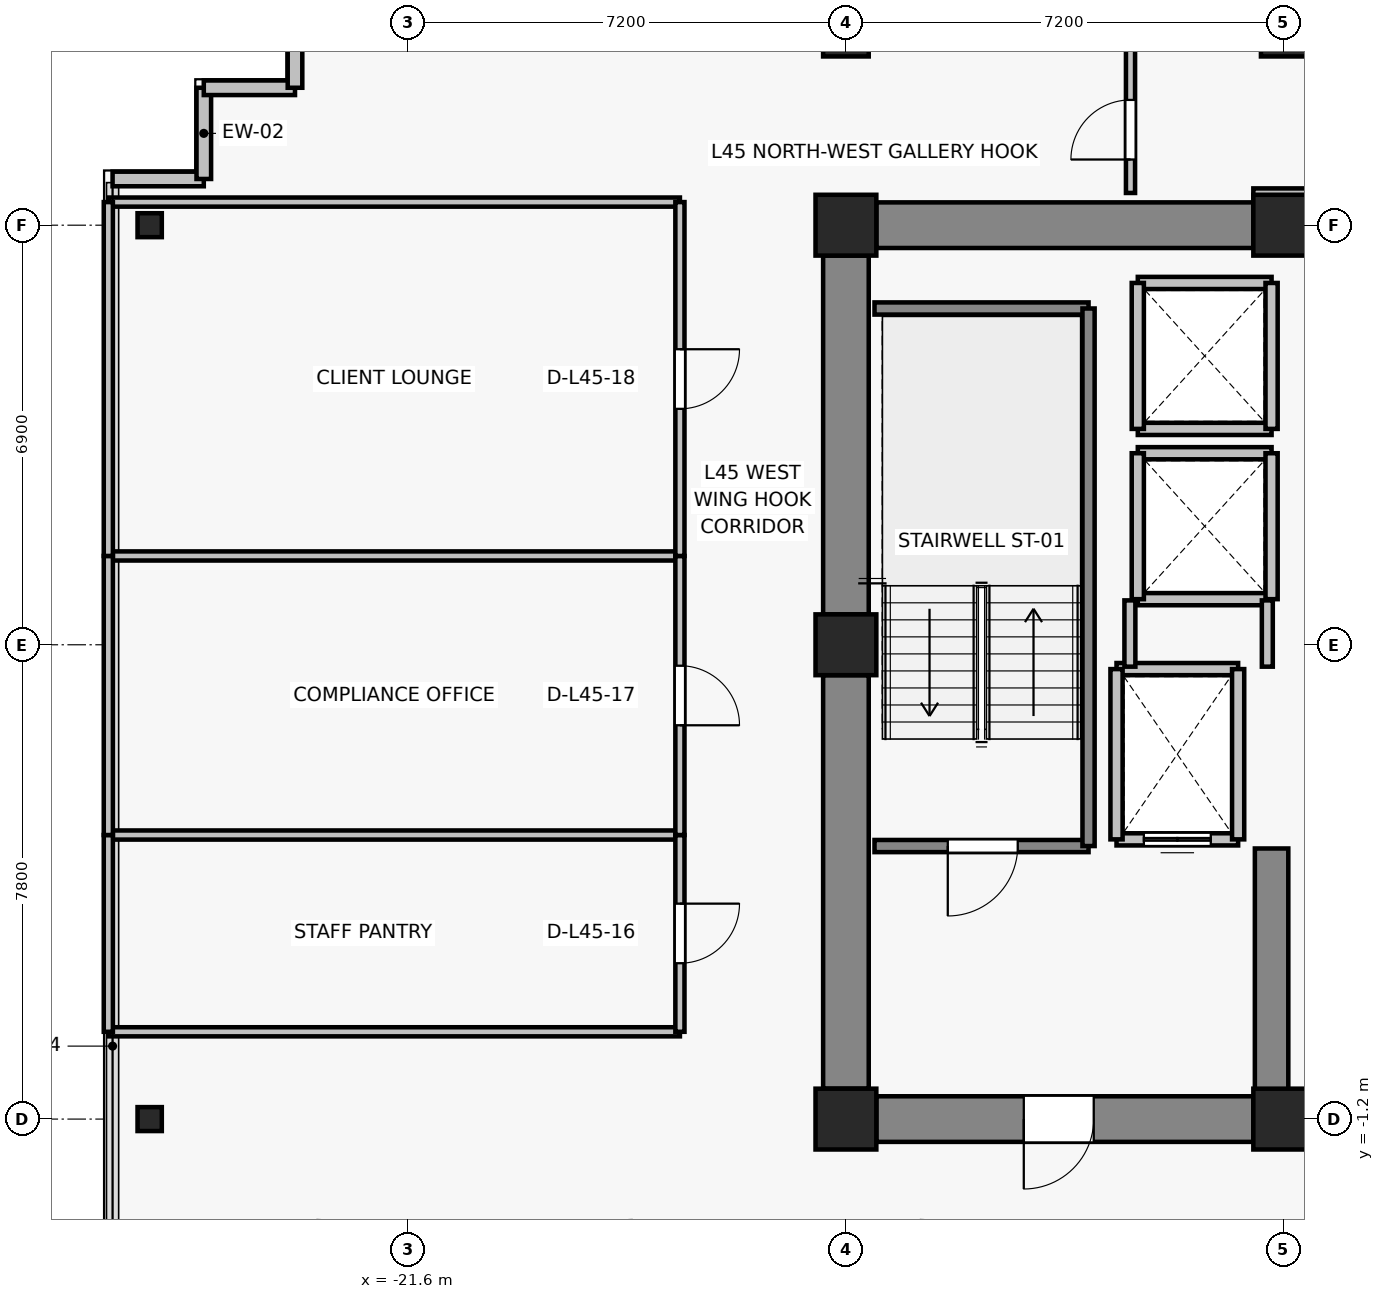
"""IFC4 building model, lengths in metres.
Left out: names, types, materials, properties, quantities, classifications, styles, units other than length and angle.
Written with IfcOpenShell. Run it as: python <this file> out.ifc"""

import sys

from ifc_helpers import new_model, si_unit, direction, frame, frame_2d, origin, origin_2d, place, context, subcontext, project, spatial, rectangle, i_section, extrude, source, transform, mapped, element, fill, save


model = new_model("IFC4")
c1 = context("Model", 3, precision=1e-05, world=origin(), true_north=direction((0.0, 1.0)))
c2 = subcontext(c1, "Body", "Model", "MODEL_VIEW")
j1 = project(units=[si_unit("LENGTHUNIT", "METRE"), si_unit("PLANEANGLEUNIT", "RADIAN")], contexts=[c1])
p1 = place(None, origin())
s1 = spatial("IfcSite", under=j1, at=p1, CompositionType="ELEMENT")
p2 = place(p1, origin())
s2 = spatial("IfcBuilding", under=s1, at=p2, CompositionType="ELEMENT")
p3 = place(p2, frame((0.0, 0.0, 162.7)))
s3 = spatial("IfcBuildingStorey", under=s2, at=p3, CompositionType="ELEMENT", Elevation=162.7)
for number, where, z_axis, x_axis in (
    (1, (-14.4, -1.2, 0.0), (0.0, 0.0, 1.0), (1.0, 0.0, 0.0)),
    (2, (-7.2, -1.2, 0.0), (0.0, 0.0, 1.0), (1.0, 0.0, 0.0)),
    (3, (-14.4, 6.6, 0.0), (0.0, 0.0, 1.0), (1.0, 0.0, 0.0)),
    (4, (-14.4, 13.5, 0.0), (0.0, 0.0, 1.0), (1.0, 0.0, 0.0)),
    (5, (-7.2, 13.5, 0.0), (0.0, 0.0, 1.0), (1.0, 0.0, 0.0)),
):
    element("IfcColumn", number, at=place(p3, frame(where, z_axis=z_axis, x_axis=x_axis)), inside=s3, PredefinedType="COLUMN", context=c2, shape_type="SweptSolid", body=[
        extrude(rectangle(XDim=1.0, YDim=1.0, at=origin_2d()), origin(), (0.0, 0.0, 1.0), 3.3),
    ])
for number, where, z_axis, x_axis in (
    (6, (-14.4, 16.65, 0.0), (0.0, 0.0, 1.0), (1.0, 0.0, 0.0)),
    (7, (-7.2, 16.65, 0.0), (0.0, 0.0, 1.0), (1.0, 0.0, 0.0)),
):
    element("IfcColumn", number, at=place(p3, frame(where, z_axis=z_axis, x_axis=x_axis)), inside=s3, PredefinedType="COLUMN", context=c2, shape_type="SweptSolid", body=[
        extrude(rectangle(XDim=0.75, YDim=0.75, at=origin_2d()), origin(), (0.0, 0.0, 1.0), 3.3),
    ])
for number, where, z_axis, x_axis in (
    (8, (-25.85, -1.2, 0.0), (0.0, 0.0, 1.0), (1.0, 0.0, 0.0)),
    (9, (-25.85, 13.5, 0.0), (0.0, 0.0, 1.0), (1.0, 0.0, 0.0)),
):
    element("IfcColumn", number, at=place(p3, frame(where, z_axis=z_axis, x_axis=x_axis)), inside=s3, PredefinedType="COLUMN", context=c2, shape_type="SweptSolid", body=[
        extrude(i_section(OverallWidth=0.399, OverallDepth=0.394, WebThickness=0.023, FlangeThickness=0.037, FilletRadius=0.015, at=origin_2d()), origin(), (0.0, 0.0, 1.0), 3.3),
    ])
p4 = place(p3, frame((-13.9, 13.5, 0.0), z_axis=(0.0, 0.0, 1.0), x_axis=(1.0, 0.0, 0.0)))
e10 = element("IfcWall", 10, at=p4, inside=s3, PredefinedType="SHEAR", context=c2, shape_type="SweptSolid", body=[
    extrude(rectangle(XDim=6.2, YDim=0.75, at=frame_2d((3.1, 0.0))), origin(), (0.0, 0.0, 1.0), 3.075),
])
p5 = place(p3, frame((-14.4, -0.7, 0.0), z_axis=(0.0, 0.0, 1.0), x_axis=(0.0, 1.0, 0.0)))
e11 = element("IfcWall", 11, at=p5, inside=s3, PredefinedType="SHEAR", context=c2, shape_type="SweptSolid", body=[
    extrude(rectangle(XDim=6.8, YDim=0.75, at=frame_2d((3.4, 0.0))), origin(), (0.0, 0.0, 1.0), 3.075),
])
p6 = place(p3, frame((-14.4, 7.1, 0.0), z_axis=(0.0, 0.0, 1.0), x_axis=(0.0, 1.0, 0.0)))
e12 = element("IfcWall", 12, at=p6, inside=s3, PredefinedType="SHEAR", context=c2, shape_type="SweptSolid", body=[
    extrude(rectangle(XDim=5.9, YDim=0.75, at=frame_2d((2.95, 0.0))), origin(), (0.0, 0.0, 1.0), 3.075),
])
p7 = place(p3, frame((-7.7, -1.2, 0.0), z_axis=(0.0, 0.0, 1.0), x_axis=(-1.0, 0.0, 0.0)))
e13 = element("IfcWall", 13, at=p7, inside=s3, PredefinedType="SHEAR", context=c2, shape_type="SweptSolid", body=[
    extrude(rectangle(XDim=6.2, YDim=0.75, at=frame_2d((3.1, 0.0))), origin(), (0.0, 0.0, 1.0), 3.075),
])
p8 = place(p7, frame((2.625, 0.0, 0.0)))
e14 = element("IfcOpeningElement", 14, at=p8, cuts=e13, PredefinedType="OPENING", context=c2, shape_type="SweptSolid", body=[
    extrude(rectangle(XDim=1.15, YDim=2.15, at=frame_2d((0.575, 1.075))), frame((0.0, 0.385, 0.0), z_axis=(0.0, -1.0, 0.0), x_axis=(1.0, 0.0, 0.0)), (0.0, 0.0, 1.0), 0.77),
])
p9 = place(p3, frame((-7.4, -0.825, 0.0), z_axis=(0.0, 0.0, 1.0), x_axis=(0.0, 1.0, 0.0)))
e15 = element("IfcWall", 15, at=p9, inside=s3, PredefinedType="SHEAR", context=c2, shape_type="SweptSolid", body=[
    extrude(rectangle(XDim=4.075, YDim=0.55, at=frame_2d((2.038, 0.0))), origin(), (0.0, 0.0, 1.0), 3.075),
])
for number, where, z_axis, x_axis in (
    (16, (-24.96, 14.26, 0.0), (0.0, 0.0, 1.0), (-1.0, 0.0, 0.0)),
    (17, (-24.96, 15.76, 0.0), (0.0, 0.0, 1.0), (0.0, -1.0, 0.0)),
    (18, (-23.46, 15.76, 0.0), (0.0, 0.0, 1.0), (-1.0, 0.0, 0.0)),
    (19, (-23.46, 17.26, 0.0), (0.0, 0.0, 1.0), (0.0, -1.0, 0.0)),
):
    element("IfcWall", number, at=place(p3, frame(where, z_axis=z_axis, x_axis=x_axis)), inside=s3, PredefinedType="SOLIDWALL", context=c2, shape_type="SweptSolid", body=[
        extrude(rectangle(XDim=1.5, YDim=0.24, at=frame_2d((0.75, 0.0))), origin(), (0.0, 0.0, 1.0), 3.075),
    ])
p10 = place(p3, frame((-7.95, 3.4, 0.0), z_axis=(0.0, 0.0, 1.0), x_axis=(-1.0, 0.0, 0.0)))
e20 = element("IfcWall", 20, at=p10, inside=s3, PredefinedType="SOLIDWALL", context=c2, shape_type="SweptSolid", body=[
    extrude(rectangle(XDim=2.0, YDim=0.2, at=frame_2d((1.0, 0.0))), origin(), (0.0, 0.0, 1.0), 3.075),
])
p11 = place(p10, frame((0.45, 0.0, 0.0)))
e21 = element("IfcOpeningElement", 21, at=p11, cuts=e20, PredefinedType="OPENING", context=c2, shape_type="SweptSolid", body=[
    extrude(rectangle(XDim=1.1, YDim=2.2, at=frame_2d((0.55, 1.1))), frame((0.0, 0.11, 0.0), z_axis=(0.0, -1.0, 0.0), x_axis=(1.0, 0.0, 0.0)), (0.0, 0.0, 1.0), 0.22),
])
p12 = place(p3, frame((-9.95, 6.2, 0.0), z_axis=(0.0, 0.0, 1.0), x_axis=(1.0, 0.0, 0.0)))
e22 = element("IfcWall", 22, at=p12, inside=s3, PredefinedType="SOLIDWALL", context=c2, shape_type="SweptSolid", body=[
    extrude(rectangle(XDim=2.0, YDim=0.2, at=frame_2d((1.0, 0.0))), origin(), (0.0, 0.0, 1.0), 3.075),
])
for number, where, z_axis, x_axis in (
    (23, (-9.95, 3.4, 0.0), (0.0, 0.0, 1.0), (0.0, 1.0, 0.0)),
    (24, (-7.95, 6.2, 0.0), (0.0, 0.0, 1.0), (0.0, -1.0, 0.0)),
):
    element("IfcWall", number, at=place(p3, frame(where, z_axis=z_axis, x_axis=x_axis)), inside=s3, PredefinedType="SOLIDWALL", context=c2, shape_type="SweptSolid", body=[
        extrude(rectangle(XDim=2.8, YDim=0.2, at=frame_2d((1.4, 0.0))), origin(), (0.0, 0.0, 1.0), 3.075),
    ])
for number, where, z_axis, x_axis in (
    (25, (-7.4, 7.35, 0.0), (0.0, 0.0, 1.0), (-1.0, 0.0, 0.0)),
    (26, (-9.6, 9.75, 0.0), (0.0, 0.0, 1.0), (1.0, 0.0, 0.0)),
):
    element("IfcWall", number, at=place(p3, frame(where, z_axis=z_axis, x_axis=x_axis)), inside=s3, PredefinedType="SOLIDWALL", context=c2, shape_type="SweptSolid", body=[
        extrude(rectangle(XDim=2.2, YDim=0.2, at=frame_2d((1.1, 0.0))), origin(), (0.0, 0.0, 1.0), 2.565),
    ])
p13 = place(p3, frame((-9.6, 7.35, 0.0), z_axis=(0.0, 0.0, 1.0), x_axis=(0.0, 1.0, 0.0)))
e27 = element("IfcWall", 27, at=p13, inside=s3, PredefinedType="SOLIDWALL", context=c2, shape_type="SweptSolid", body=[
    extrude(rectangle(XDim=2.4, YDim=0.2, at=frame_2d((1.2, 0.0))), origin(), (0.0, 0.0, 1.0), 3.075),
])
p14 = place(p3, frame((-7.4, 9.75, 0.0), z_axis=(0.0, 0.0, 1.0), x_axis=(0.0, -1.0, 0.0)))
e28 = element("IfcWall", 28, at=p14, inside=s3, PredefinedType="SOLIDWALL", context=c2, shape_type="SweptSolid", body=[
    extrude(rectangle(XDim=2.4, YDim=0.2, at=frame_2d((1.2, 0.0))), origin(), (0.0, 0.0, 1.0), 2.565),
])
for number, where, z_axis, x_axis in (
    (29, (-7.4, 10.15, 0.0), (0.0, 0.0, 1.0), (-1.0, 0.0, 0.0)),
    (30, (-9.6, 12.55, 0.0), (0.0, 0.0, 1.0), (1.0, 0.0, 0.0)),
):
    element("IfcWall", number, at=place(p3, frame(where, z_axis=z_axis, x_axis=x_axis)), inside=s3, PredefinedType="SOLIDWALL", context=c2, shape_type="SweptSolid", body=[
        extrude(rectangle(XDim=2.2, YDim=0.2, at=frame_2d((1.1, 0.0))), origin(), (0.0, 0.0, 1.0), 2.565),
    ])
p15 = place(p3, frame((-9.6, 10.15, 0.0), z_axis=(0.0, 0.0, 1.0), x_axis=(0.0, 1.0, 0.0)))
e31 = element("IfcWall", 31, at=p15, inside=s3, PredefinedType="SOLIDWALL", context=c2, shape_type="SweptSolid", body=[
    extrude(rectangle(XDim=2.4, YDim=0.2, at=frame_2d((1.2, 0.0))), origin(), (0.0, 0.0, 1.0), 3.075),
])
p16 = place(p3, frame((-7.4, 12.55, 0.0), z_axis=(0.0, 0.0, 1.0), x_axis=(0.0, -1.0, 0.0)))
e32 = element("IfcWall", 32, at=p16, inside=s3, PredefinedType="SOLIDWALL", context=c2, shape_type="SweptSolid", body=[
    extrude(rectangle(XDim=2.4, YDim=0.2, at=frame_2d((1.2, 0.0))), origin(), (0.0, 0.0, 1.0), 2.565),
])
p17 = place(p3, frame((-10.41, 3.29, 0.0), z_axis=(0.0, 0.0, 1.0), x_axis=(-1.0, 0.0, 0.0)))
e33 = element("IfcWall", 33, at=p17, inside=s3, PredefinedType="SOLIDWALL", context=c2, shape_type="SweptSolid", body=[
    extrude(rectangle(XDim=3.52, YDim=0.2, at=frame_2d((1.76, 0.0))), origin(), (0.0, 0.0, 1.0), 3.075),
])
p18 = place(p17, frame((1.165, 0.0, 0.0)))
e34 = element("IfcOpeningElement", 34, at=p18, cuts=e33, PredefinedType="OPENING", context=c2, shape_type="SweptSolid", body=[
    extrude(rectangle(XDim=1.15, YDim=2.15, at=frame_2d((0.575, 1.075))), frame((0.0, 0.11, 0.0), z_axis=(0.0, -1.0, 0.0), x_axis=(1.0, 0.0, 0.0)), (0.0, 0.0, 1.0), 0.22),
])
p19 = place(p3, frame((-13.93, 12.13, 0.0), z_axis=(0.0, 0.0, 1.0), x_axis=(1.0, 0.0, 0.0)))
e35 = element("IfcWall", 35, at=p19, inside=s3, PredefinedType="SOLIDWALL", context=c2, shape_type="SweptSolid", body=[
    extrude(rectangle(XDim=3.52, YDim=0.2, at=frame_2d((1.76, 0.0))), origin(), (0.0, 0.0, 1.0), 3.075),
])
p20 = place(p3, frame((-10.41, 12.13, 0.0), z_axis=(0.0, 0.0, 1.0), x_axis=(0.0, -1.0, 0.0)))
e36 = element("IfcWall", 36, at=p20, inside=s3, PredefinedType="SOLIDWALL", context=c2, shape_type="SweptSolid", body=[
    extrude(rectangle(XDim=8.84, YDim=0.2, at=frame_2d((4.42, 0.0))), origin(), (0.0, 0.0, 1.0), 3.075),
])
p21 = place(p3, frame((-9.73, 6.24, 0.0), z_axis=(0.0, 0.0, 1.0), x_axis=(0.0, 1.0, 0.0)))
e37 = element("IfcWall", 37, at=p21, inside=s3, PredefinedType="PARTITIONING", context=c2, shape_type="SweptSolid", body=[
    extrude(rectangle(XDim=1.09, YDim=0.18, at=frame_2d((0.545, 0.0))), origin(), (0.0, 0.0, 1.0), 3.075),
])
p22 = place(p3, frame((-7.47, 7.33, 0.0), z_axis=(0.0, 0.0, 1.0), x_axis=(0.0, -1.0, 0.0)))
e38 = element("IfcWall", 38, at=p22, inside=s3, PredefinedType="PARTITIONING", context=c2, shape_type="SweptSolid", body=[
    extrude(rectangle(XDim=1.09, YDim=0.18, at=frame_2d((0.545, 0.0))), origin(), (0.0, 0.0, 1.0), 2.565),
])
for number, where, z_axis, x_axis in (
    (39, (-17.13, 0.236, 0.0), (0.0, 0.0, 1.0), (-1.0, 0.0, 0.0)),
    (40, (-26.53, 3.471, 0.0), (0.0, 0.0, 1.0), (1.0, 0.0, 0.0)),
):
    element("IfcWall", number, at=place(p3, frame(where, z_axis=z_axis, x_axis=x_axis)), inside=s3, PredefinedType="PARTITIONING", context=c2, shape_type="SweptSolid", body=[
        extrude(rectangle(XDim=9.4, YDim=0.15, at=frame_2d((4.7, 0.0))), origin(), (0.0, 0.0, 1.0), 2.565),
    ])
p23 = place(p3, frame((-26.53, 0.236, 0.0), z_axis=(0.0, 0.0, 1.0), x_axis=(0.0, 1.0, 0.0)))
e41 = element("IfcWall", 41, at=p23, inside=s3, PredefinedType="PARTITIONING", context=c2, shape_type="SweptSolid", body=[
    extrude(rectangle(XDim=3.236, YDim=0.15, at=frame_2d((1.618, 0.0))), origin(), (0.0, 0.0, 1.0), 3.075),
])
p24 = place(p3, frame((-17.13, 3.471, 0.0), z_axis=(0.0, 0.0, 1.0), x_axis=(0.0, -1.0, 0.0)))
e42 = element("IfcWall", 42, at=p24, inside=s3, PredefinedType="PARTITIONING", context=c2, shape_type="SweptSolid", body=[
    extrude(rectangle(XDim=3.236, YDim=0.15, at=frame_2d((1.618, 0.0))), origin(), (0.0, 0.0, 1.0), 3.075),
])
p25 = place(p24, frame((1.128, 0.0, 0.0)))
e43 = element("IfcOpeningElement", 43, at=p25, cuts=e42, PredefinedType="OPENING", context=c2, shape_type="SweptSolid", body=[
    extrude(rectangle(XDim=0.98, YDim=2.15, at=frame_2d((0.49, 1.075))), frame((0.0, 0.085, 0.0), z_axis=(0.0, -1.0, 0.0), x_axis=(1.0, 0.0, 0.0)), (0.0, 0.0, 1.0), 0.17),
])
p26 = place(p3, frame((-26.53, 8.061, 0.0), z_axis=(0.0, 0.0, 1.0), x_axis=(1.0, 0.0, 0.0)))
e44 = element("IfcWall", 44, at=p26, inside=s3, PredefinedType="PARTITIONING", context=c2, shape_type="SweptSolid", body=[
    extrude(rectangle(XDim=9.4, YDim=0.15, at=frame_2d((4.7, 0.0))), origin(), (0.0, 0.0, 1.0), 2.565),
])
p27 = place(p3, frame((-26.53, 3.471, 0.0), z_axis=(0.0, 0.0, 1.0), x_axis=(0.0, 1.0, 0.0)))
e45 = element("IfcWall", 45, at=p27, inside=s3, PredefinedType="PARTITIONING", context=c2, shape_type="SweptSolid", body=[
    extrude(rectangle(XDim=4.589, YDim=0.15, at=frame_2d((2.295, 0.0))), origin(), (0.0, 0.0, 1.0), 3.075),
])
p28 = place(p3, frame((-17.13, 8.061, 0.0), z_axis=(0.0, 0.0, 1.0), x_axis=(0.0, -1.0, 0.0)))
e46 = element("IfcWall", 46, at=p28, inside=s3, PredefinedType="PARTITIONING", context=c2, shape_type="SweptSolid", body=[
    extrude(rectangle(XDim=4.589, YDim=0.15, at=frame_2d((2.295, 0.0))), origin(), (0.0, 0.0, 1.0), 3.075),
])
p29 = place(p28, frame((1.804, 0.0, 0.0)))
e47 = element("IfcOpeningElement", 47, at=p29, cuts=e46, PredefinedType="OPENING", context=c2, shape_type="SweptSolid", body=[
    extrude(rectangle(XDim=0.98, YDim=2.15, at=frame_2d((0.49, 1.075))), frame((0.0, 0.085, 0.0), z_axis=(0.0, -1.0, 0.0), x_axis=(1.0, 0.0, 0.0)), (0.0, 0.0, 1.0), 0.17),
])
p30 = place(p3, frame((-26.53, 13.88, 0.0), z_axis=(0.0, 0.0, 1.0), x_axis=(1.0, 0.0, 0.0)))
e48 = element("IfcWall", 48, at=p30, inside=s3, PredefinedType="PARTITIONING", context=c2, shape_type="SweptSolid", body=[
    extrude(rectangle(XDim=9.4, YDim=0.15, at=frame_2d((4.7, 0.0))), origin(), (0.0, 0.0, 1.0), 3.075),
])
p31 = place(p3, frame((-26.53, 8.061, 0.0), z_axis=(0.0, 0.0, 1.0), x_axis=(0.0, 1.0, 0.0)))
e49 = element("IfcWall", 49, at=p31, inside=s3, PredefinedType="PARTITIONING", context=c2, shape_type="SweptSolid", body=[
    extrude(rectangle(XDim=5.819, YDim=0.15, at=frame_2d((2.91, 0.0))), origin(), (0.0, 0.0, 1.0), 3.075),
])
p32 = place(p3, frame((-17.13, 13.88, 0.0), z_axis=(0.0, 0.0, 1.0), x_axis=(0.0, -1.0, 0.0)))
e50 = element("IfcWall", 50, at=p32, inside=s3, PredefinedType="PARTITIONING", context=c2, shape_type="SweptSolid", body=[
    extrude(rectangle(XDim=5.819, YDim=0.15, at=frame_2d((2.91, 0.0))), origin(), (0.0, 0.0, 1.0), 2.565),
])
p33 = place(p32, frame((2.42, 0.0, 0.0)))
e51 = element("IfcOpeningElement", 51, at=p33, cuts=e50, PredefinedType="OPENING", context=c2, shape_type="SweptSolid", body=[
    extrude(rectangle(XDim=0.98, YDim=2.15, at=frame_2d((0.49, 1.075))), frame((0.0, 0.085, 0.0), z_axis=(0.0, -1.0, 0.0), x_axis=(1.0, 0.0, 0.0)), (0.0, 0.0, 1.0), 0.17),
])
p34 = place(p3, frame((-6.7, 14.03, 0.0), z_axis=(0.0, 0.0, 1.0), x_axis=(-1.0, 0.0, 0.0)))
e52 = element("IfcWall", 52, at=p34, inside=s3, PredefinedType="PARTITIONING", context=c2, shape_type="SweptSolid", body=[
    extrude(rectangle(XDim=1.0, YDim=0.15, at=frame_2d((0.5, 0.0))), origin(), (0.0, 0.0, 1.0), 2.565),
])
p35 = place(p3, frame((-9.72, 14.03, 0.0), z_axis=(0.0, 0.0, 1.0), x_axis=(0.0, 1.0, 0.0)))
e53 = element("IfcWall", 53, at=p35, inside=s3, PredefinedType="PARTITIONING", context=c2, shape_type="SweptSolid", body=[
    extrude(rectangle(XDim=3.3, YDim=0.15, at=frame_2d((1.65, 0.0))), origin(), (0.0, 0.0, 1.0), 2.565),
])
p36 = place(p35, frame((0.55, 0.0, 0.0)))
e54 = element("IfcOpeningElement", 54, at=p36, cuts=e53, PredefinedType="OPENING", context=c2, shape_type="SweptSolid", body=[
    extrude(rectangle(XDim=0.98, YDim=2.15, at=frame_2d((0.49, 1.075))), frame((0.0, 0.085, 0.0), z_axis=(0.0, -1.0, 0.0), x_axis=(1.0, 0.0, 0.0)), (0.0, 0.0, 1.0), 0.17),
])
m1 = source(origin(), c2, "Body", "SweptSolid", [
    extrude(rectangle(XDim=1.1, YDim=2.2, at=frame_2d((0.55, 1.1))), frame((0.0, 0.025, 0.0), z_axis=(0.0, -1.0, 0.0), x_axis=(1.0, 0.0, 0.0)), (0.0, 0.0, 1.0), 0.05),
])
p37 = place(p11, origin())
e55 = element("IfcDoor", 55, at=p37, inside=s3, OperationType="DOUBLE_DOOR_SLIDING", PredefinedType="DOOR", context=c2, shape_type="MappedRepresentation", body=[
    mapped(m1, transform((0.0, 0.0, 0.0), x_axis=(1.0, 0.0, 0.0), y_axis=(0.0, 1.0, 0.0), z_axis=(0.0, 0.0, 1.0), scale=1.0)),
])
fill(e21, e55)
m2 = source(origin(), c2, "Body", "SweptSolid", [
    extrude(rectangle(XDim=1.15, YDim=2.15, at=frame_2d((0.575, 1.075))), frame((0.0, 0.025, 0.0), z_axis=(0.0, -1.0, 0.0), x_axis=(1.0, 0.0, 0.0)), (0.0, 0.0, 1.0), 0.05),
])
p38 = place(p18, origin())
e56 = element("IfcDoor", 56, at=p38, inside=s3, OperationType="SINGLE_SWING_RIGHT", PredefinedType="DOOR", context=c2, shape_type="MappedRepresentation", body=[
    mapped(m2, transform((0.0, 0.0, 0.0), x_axis=(1.0, 0.0, 0.0), y_axis=(0.0, 1.0, 0.0), z_axis=(0.0, 0.0, 1.0), scale=1.0)),
])
fill(e34, e56)
p39 = place(p8, origin())
e57 = element("IfcDoor", 57, at=p39, inside=s3, OperationType="SINGLE_SWING_RIGHT", PredefinedType="DOOR", context=c2, shape_type="MappedRepresentation", body=[
    mapped(m2, transform((0.0, 0.0, 0.0), x_axis=(1.0, 0.0, 0.0), y_axis=(0.0, 1.0, 0.0), z_axis=(0.0, 0.0, 1.0), scale=1.0)),
])
fill(e14, e57)
m3 = source(origin(), c2, "Body", "SweptSolid", [
    extrude(rectangle(XDim=0.98, YDim=2.15, at=frame_2d((0.49, 1.075))), frame((0.0, 0.025, 0.0), z_axis=(0.0, -1.0, 0.0), x_axis=(1.0, 0.0, 0.0)), (0.0, 0.0, 1.0), 0.05),
])
p40 = place(p25, origin())
e58 = element("IfcDoor", 58, at=p40, inside=s3, OperationType="SINGLE_SWING_LEFT", PredefinedType="DOOR", context=c2, shape_type="MappedRepresentation", body=[
    mapped(m3, transform((0.0, 0.0, 0.0), x_axis=(1.0, 0.0, 0.0), y_axis=(0.0, 1.0, 0.0), z_axis=(0.0, 0.0, 1.0), scale=1.0)),
])
fill(e43, e58)
p41 = place(p29, origin())
e59 = element("IfcDoor", 59, at=p41, inside=s3, OperationType="SINGLE_SWING_RIGHT", PredefinedType="DOOR", context=c2, shape_type="MappedRepresentation", body=[
    mapped(m3, transform((0.0, 0.0, 0.0), x_axis=(1.0, 0.0, 0.0), y_axis=(0.0, 1.0, 0.0), z_axis=(0.0, 0.0, 1.0), scale=1.0)),
])
fill(e47, e59)
p42 = place(p33, origin())
e60 = element("IfcDoor", 60, at=p42, inside=s3, OperationType="SINGLE_SWING_LEFT", PredefinedType="DOOR", context=c2, shape_type="MappedRepresentation", body=[
    mapped(m3, transform((0.0, 0.0, 0.0), x_axis=(1.0, 0.0, 0.0), y_axis=(0.0, 1.0, 0.0), z_axis=(0.0, 0.0, 1.0), scale=1.0)),
])
fill(e51, e60)
p43 = place(p36, origin())
e61 = element("IfcDoor", 61, at=p43, inside=s3, OperationType="SINGLE_SWING_LEFT", PredefinedType="DOOR", context=c2, shape_type="MappedRepresentation", body=[
    mapped(m3, transform((0.0, 0.0, 0.0), x_axis=(1.0, 0.0, 0.0), y_axis=(0.0, 1.0, 0.0), z_axis=(0.0, 0.0, 1.0), scale=1.0)),
])
fill(e54, e61)
save(model, sys.argv[1])
